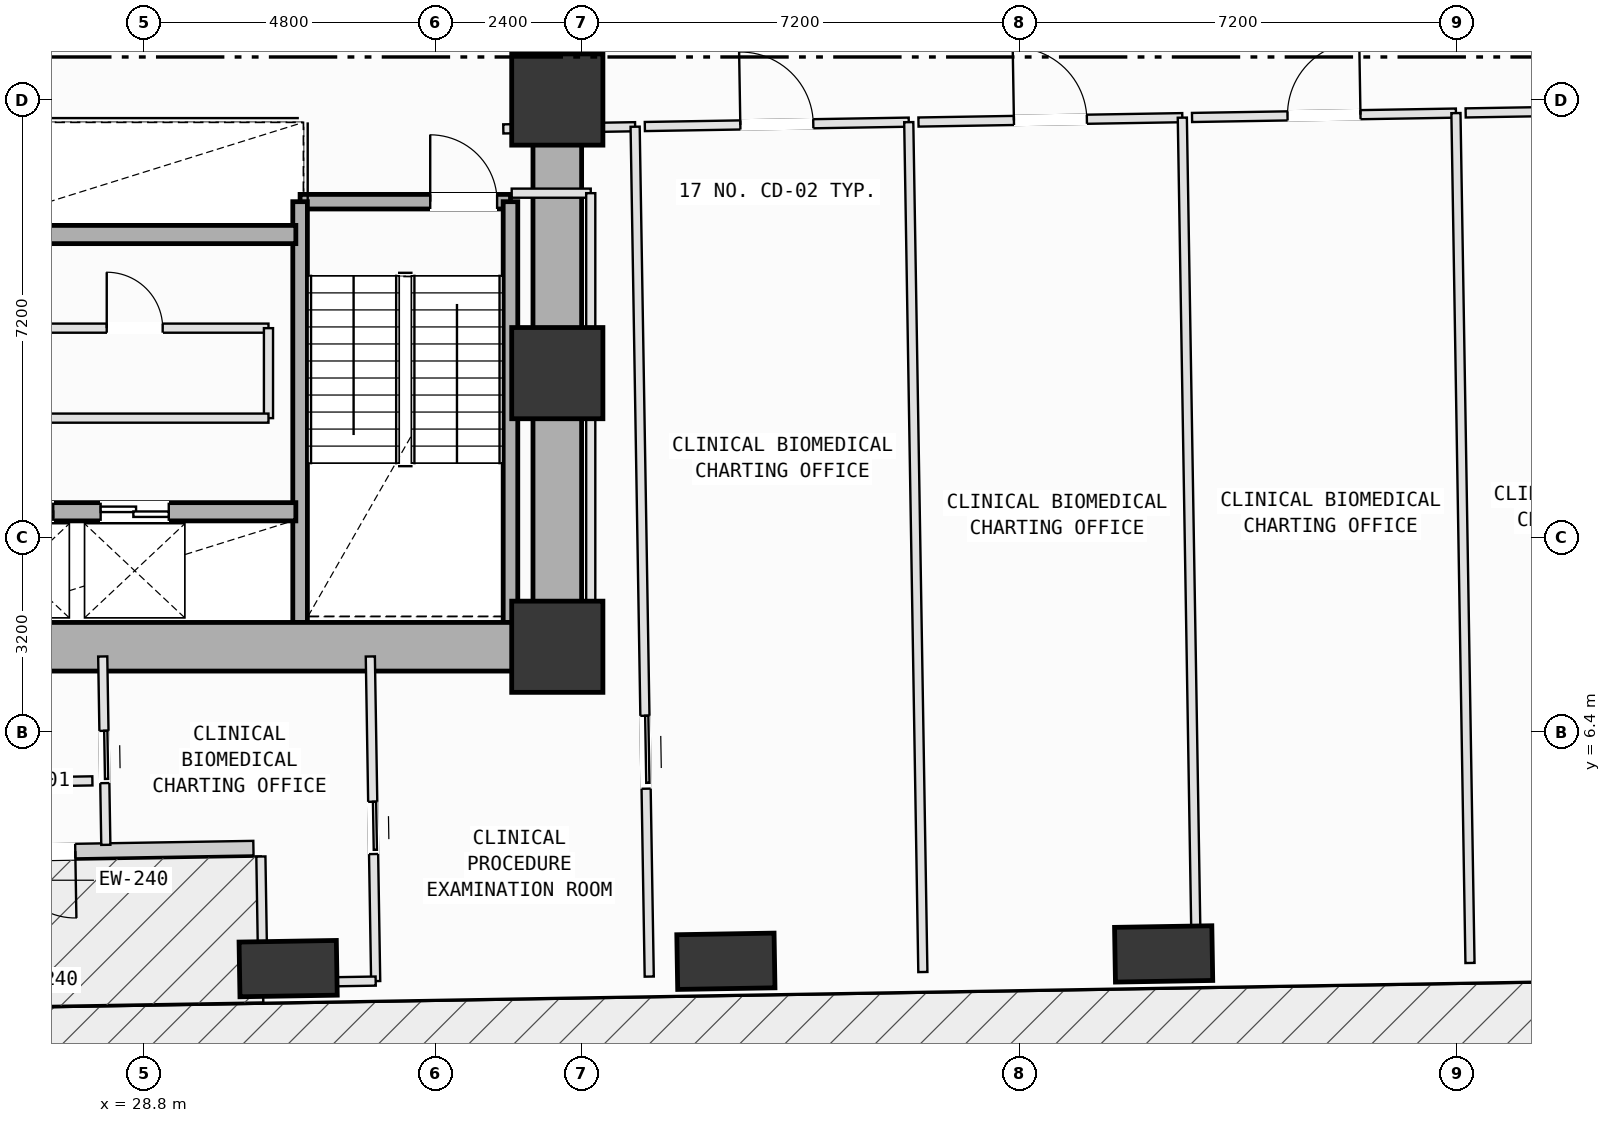
"""IFC4 building model, lengths in metres.
Left out: names, types, materials, properties, quantities, classifications, styles, units other than length and angle.
Written with IfcOpenShell. Run it as: python <this file> out.ifc"""

import sys

from ifc_helpers import new_model, si_unit, direction, frame, frame_2d, origin, origin_2d, place, context, subcontext, project, spatial, rectangle, extrude, element, fill, save


model = new_model("IFC4")
c1 = context("Model", 3, precision=1e-05, world=origin(), true_north=direction((0.0, 1.0)))
c2 = subcontext(c1, "Body", "Model", "MODEL_VIEW")
j1 = project(units=[si_unit("LENGTHUNIT", "METRE"), si_unit("PLANEANGLEUNIT", "RADIAN")], contexts=[c1])
p1 = place(None, origin())
s1 = spatial("IfcSite", under=j1, at=p1, CompositionType="ELEMENT")
p2 = place(p1, origin())
s2 = spatial("IfcBuilding", under=s1, at=p2, CompositionType="ELEMENT")
p3 = place(p2, frame((0.0, 0.0, 27.0)))
s3 = spatial("IfcBuildingStorey", under=s2, at=p3, CompositionType="ELEMENT", Elevation=27.0)
for number, where, z_axis, x_axis in (
    (1, (35.6, 7.8, 0.0), (0.0, 0.0, 1.0), (1.0, 0.0, 0.0)),
    (2, (35.6, 12.3, 0.0), (0.0, 0.0, 1.0), (1.0, 0.0, 0.0)),
    (3, (35.6, 16.8, 0.0), (0.0, 0.0, 1.0), (1.0, 0.0, 0.0)),
):
    element("IfcColumn", number, at=place(p3, frame(where, z_axis=z_axis, x_axis=x_axis)), inside=s3, PredefinedType="COLUMN", context=c2, shape_type="SweptSolid", body=[
        extrude(rectangle(XDim=1.5, YDim=1.5, at=origin_2d()), origin(), (0.0, 0.0, 1.0), 4.0),
    ])
p4 = place(p3, frame((31.174, 2.506, 0.045), z_axis=(0.092062174352, -0.009224666769, 0.995710531016), x_axis=(0.083260947283, 0.996526598458, 0.001534022092)))
e4 = element("IfcColumn", 4, at=p4, inside=s3, PredefinedType="COLUMN", context=c2, shape_type="SweptSolid", body=[
    extrude(rectangle(XDim=1.6, YDim=0.9, at=origin_2d()), origin(), (0.0, 0.0, 1.0), 3.97),
])
p5 = place(p3, frame((38.373, 2.627, 0.046), z_axis=(0.091326415015, 0.020417757431, 0.995611671839), x_axis=(-0.234262210703, 0.972172211749, 0.001551560232)))
e5 = element("IfcColumn", 5, at=p5, inside=s3, PredefinedType="COLUMN", context=c2, shape_type="SweptSolid", body=[
    extrude(rectangle(XDim=1.6, YDim=0.9, at=origin_2d()), origin(), (0.0, 0.0, 1.0), 3.97),
])
p6 = place(p3, frame((45.572, 2.748, 0.051), z_axis=(0.090543922154, 0.050131315595, 0.994629905723), x_axis=(-0.498741414355, 0.866749131608, 0.001715944321)))
e6 = element("IfcColumn", 6, at=p6, inside=s3, PredefinedType="COLUMN", context=c2, shape_type="SweptSolid", body=[
    extrude(rectangle(XDim=1.6, YDim=0.9, at=origin_2d()), origin(), (0.0, 0.0, 1.0), 3.969),
])
p7 = place(p3, frame((30.602, 4.488, 0.0), z_axis=(0.0, 0.0, 1.0), x_axis=(-0.999862345318, -0.016591877959, 0.0)))
e7 = element("IfcWall", 7, at=p7, inside=s3, PredefinedType="SOLIDWALL", context=c2, shape_type="SweptSolid", body=[
    extrude(rectangle(XDim=6.96, YDim=0.24, at=frame_2d((3.48, 0.0))), origin(), (0.0, 0.0, 1.0), 3.165),
])
p8 = place(p7, frame((2.93, 0.0, 0.0)))
e8 = element("IfcOpeningElement", 8, at=p8, cuts=e7, PredefinedType="OPENING", context=c2, shape_type="SweptSolid", body=[
    extrude(rectangle(XDim=1.1, YDim=2.15, at=frame_2d((0.55, 1.075))), frame((0.0, 0.13, 0.0), z_axis=(0.0, -1.0, 0.0), x_axis=(1.0, 0.0, 0.0)), (0.0, 0.0, 1.0), 0.26),
])
p9 = place(p3, frame((31.37, 15.12, 0.0), z_axis=(0.0, 0.0, 1.0), x_axis=(1.0, 0.0, 0.0)))
e9 = element("IfcWall", 9, at=p9, inside=s3, PredefinedType="SOLIDWALL", context=c2, shape_type="SweptSolid", body=[
    extrude(rectangle(XDim=3.46, YDim=0.24, at=frame_2d((1.73, 0.0))), origin(), (0.0, 0.0, 1.0), 3.78),
])
p10 = place(p9, frame((2.14, 0.0, 0.0)))
e10 = element("IfcOpeningElement", 10, at=p10, cuts=e9, PredefinedType="OPENING", context=c2, shape_type="SweptSolid", body=[
    extrude(rectangle(XDim=1.1, YDim=2.15, at=frame_2d((0.55, 1.075))), frame((0.0, 0.13, 0.0), z_axis=(0.0, -1.0, 0.0), x_axis=(1.0, 0.0, 0.0)), (0.0, 0.0, 1.0), 0.26),
])
for number, where, z_axis, x_axis in (
    (11, (34.83, 15.12, 0.0), (0.0, 0.0, 1.0), (0.0, -1.0, 0.0)),
    (12, (31.37, 8.2, 0.0), (0.0, 0.0, 1.0), (0.0, 1.0, 0.0)),
):
    element("IfcWall", number, at=place(p3, frame(where, z_axis=z_axis, x_axis=x_axis)), inside=s3, PredefinedType="SOLIDWALL", context=c2, shape_type="SweptSolid", body=[
        extrude(rectangle(XDim=6.92, YDim=0.24, at=frame_2d((3.46, 0.0))), origin(), (0.0, 0.0, 1.0), 3.78),
    ])
p11 = place(p3, frame((24.8, 7.8, 0.0), z_axis=(0.0, 0.0, 1.0), x_axis=(1.0, 0.0, 0.0)))
e13 = element("IfcWall", 13, at=p11, inside=s3, PredefinedType="SHEAR", context=c2, shape_type="SweptSolid", body=[
    extrude(rectangle(XDim=10.8, YDim=0.8, at=frame_2d((5.4, 0.0))), origin(), (0.0, 0.0, 1.0), 3.78),
])
p12 = place(p3, frame((35.6, 7.8, 0.0), z_axis=(0.0, 0.0, 1.0), x_axis=(0.0, 1.0, 0.0)))
e14 = element("IfcWall", 14, at=p12, inside=s3, PredefinedType="SHEAR", context=c2, shape_type="SweptSolid", body=[
    extrude(rectangle(XDim=9.0, YDim=0.8, at=frame_2d((4.5, 0.0))), origin(), (0.0, 0.0, 1.0), 3.78),
])
p13 = place(p3, frame((25.85, 10.02, 0.0), z_axis=(0.0, 0.0, 1.0), x_axis=(1.0, 0.0, 0.0)))
e15 = element("IfcWall", 15, at=p13, inside=s3, PredefinedType="SOLIDWALL", context=c2, shape_type="SweptSolid", body=[
    extrude(rectangle(XDim=5.45, YDim=0.3, at=frame_2d((2.725, 0.0))), origin(), (0.0, 0.0, 1.0), 3.78),
])
p14 = place(p13, frame((0.34, 0.0, 0.0)))
e16 = element("IfcOpeningElement", 16, at=p14, cuts=e15, PredefinedType="OPENING", context=c2, shape_type="SweptSolid", body=[
    extrude(rectangle(XDim=1.12, YDim=2.15, at=frame_2d((0.56, 1.075))), frame((0.0, 0.16, 0.0), z_axis=(0.0, -1.0, 0.0), x_axis=(1.0, 0.0, 0.0)), (0.0, 0.0, 1.0), 0.32),
])
p15 = place(p13, frame((2.24, 0.0, 0.0)))
e17 = element("IfcOpeningElement", 17, at=p15, cuts=e15, PredefinedType="OPENING", context=c2, shape_type="SweptSolid", body=[
    extrude(rectangle(XDim=1.12, YDim=2.15, at=frame_2d((0.56, 1.075))), frame((0.0, 0.16, 0.0), z_axis=(0.0, -1.0, 0.0), x_axis=(1.0, 0.0, 0.0)), (0.0, 0.0, 1.0), 0.32),
])
p16 = place(p3, frame((25.85, 14.58, 0.0), z_axis=(0.0, 0.0, 1.0), x_axis=(1.0, 0.0, 0.0)))
e18 = element("IfcWall", 18, at=p16, inside=s3, PredefinedType="SOLIDWALL", context=c2, shape_type="SweptSolid", body=[
    extrude(rectangle(XDim=5.45, YDim=0.3, at=frame_2d((2.725, 0.0))), origin(), (0.0, 0.0, 1.0), 3.78),
])
p17 = place(p3, frame((26.45, 13.04, 0.0), z_axis=(0.0, 0.0, 1.0), x_axis=(1.0, 0.0, 0.0)))
e19 = element("IfcWall", 19, at=p17, inside=s3, PredefinedType="PARTITIONING", context=c2, shape_type="SweptSolid", body=[
    extrude(rectangle(XDim=4.4, YDim=0.15, at=frame_2d((2.2, 0.0))), origin(), (0.0, 0.0, 1.0), 3.78),
])
p18 = place(p17, frame((1.74, 0.0, 0.0)))
e20 = element("IfcOpeningElement", 20, at=p18, cuts=e19, PredefinedType="OPENING", context=c2, shape_type="SweptSolid", body=[
    extrude(rectangle(XDim=0.92, YDim=2.1, at=frame_2d((0.46, 1.05))), frame((0.0, 0.085, 0.0), z_axis=(0.0, -1.0, 0.0), x_axis=(1.0, 0.0, 0.0)), (0.0, 0.0, 1.0), 0.17),
])
p19 = place(p3, frame((30.85, 13.04, 0.0), z_axis=(0.0, 0.0, 1.0), x_axis=(0.0, -1.0, 0.0)))
e21 = element("IfcWall", 21, at=p19, inside=s3, PredefinedType="PARTITIONING", context=c2, shape_type="SweptSolid", body=[
    extrude(rectangle(XDim=1.48, YDim=0.15, at=frame_2d((0.74, 0.0))), origin(), (0.0, 0.0, 1.0), 3.78),
])
p20 = place(p3, frame((30.85, 11.56, 0.0), z_axis=(0.0, 0.0, 1.0), x_axis=(-1.0, 0.0, 0.0)))
e22 = element("IfcWall", 22, at=p20, inside=s3, PredefinedType="PARTITIONING", context=c2, shape_type="SweptSolid", body=[
    extrude(rectangle(XDim=4.4, YDim=0.15, at=frame_2d((2.2, 0.0))), origin(), (0.0, 0.0, 1.0), 3.78),
])
p21 = place(p3, frame((28.124, 7.64, 0.0), z_axis=(0.0, 0.0, 1.0), x_axis=(0.016468725329, -0.999864381347, 0.0)))
e23 = element("IfcWall", 23, at=p21, inside=s3, PredefinedType="PARTITIONING", context=c2, shape_type="SweptSolid", body=[
    extrude(rectangle(XDim=3.098, YDim=0.15, at=frame_2d((1.549, 0.0))), origin(), (0.0, 0.0, 1.0), 3.78),
])
p22 = place(p21, frame((1.223, 0.0, 0.0)))
e24 = element("IfcOpeningElement", 24, at=p22, cuts=e23, PredefinedType="OPENING", context=c2, shape_type="SweptSolid", body=[
    extrude(rectangle(XDim=0.86, YDim=2.06, at=frame_2d((0.43, 1.03))), frame((0.0, 0.085, 0.0), z_axis=(0.0, -1.0, 0.0), x_axis=(1.0, 0.0, 0.0)), (0.0, 0.0, 1.0), 0.17),
])
p23 = place(p3, frame((27.954, 5.594, 0.0), z_axis=(0.0, 0.0, 1.0), x_axis=(-0.999863680072, -0.016511246871, 0.0)))
e25 = element("IfcWall", 25, at=p23, inside=s3, PredefinedType="PARTITIONING", context=c2, shape_type="SweptSolid", body=[
    extrude(rectangle(XDim=1.7, YDim=0.15, at=frame_2d((0.85, 0.0))), origin(), (0.0, 0.0, 1.0), 3.78),
])
p24 = place(p3, frame((32.525, 7.64, 0.0), z_axis=(0.0, 0.0, 1.0), x_axis=(0.016505890819, -0.999863768505, 0.0)))
e26 = element("IfcWall", 26, at=p24, inside=s3, PredefinedType="PARTITIONING", context=c2, shape_type="SweptSolid", body=[
    extrude(rectangle(XDim=5.34, YDim=0.15, at=frame_2d((2.67, 0.0))), origin(), (0.0, 0.0, 1.0), 3.78),
])
p25 = place(p24, frame((2.39, 0.0, 0.0)))
e27 = element("IfcOpeningElement", 27, at=p25, cuts=e26, PredefinedType="OPENING", context=c2, shape_type="SweptSolid", body=[
    extrude(rectangle(XDim=0.86, YDim=2.06, at=frame_2d((0.43, 1.03))), frame((0.0, 0.085, 0.0), z_axis=(0.0, -1.0, 0.0), x_axis=(1.0, 0.0, 0.0)), (0.0, 0.0, 1.0), 0.17),
])
p26 = place(p3, frame((32.613, 2.301, 0.0), z_axis=(0.0, 0.0, 1.0), x_axis=(-0.999860187766, -0.016721391078, 0.0)))
e28 = element("IfcWall", 28, at=p26, inside=s3, PredefinedType="PARTITIONING", context=c2, shape_type="SweptSolid", body=[
    extrude(rectangle(XDim=1.854, YDim=0.15, at=frame_2d((0.927, 0.0))), origin(), (0.0, 0.0, 1.0), 3.145),
])
p27 = place(p3, frame((30.759, 2.27, 0.0), z_axis=(0.0, 0.0, 1.0), x_axis=(-0.016312383245, 0.999866944225, 0.0)))
e29 = element("IfcWall", 29, at=p27, inside=s3, PredefinedType="PARTITIONING", context=c2, shape_type="SweptSolid", body=[
    extrude(rectangle(XDim=2.08, YDim=0.15, at=frame_2d((1.04, 0.0))), origin(), (0.0, 0.0, 1.0), 3.78),
])
p28 = place(p3, frame((36.15, 15.26, 0.0), z_axis=(0.0, 0.0, 1.0), x_axis=(-1.0, 0.0, 0.0)))
e30 = element("IfcWall", 30, at=p28, inside=s3, PredefinedType="PARTITIONING", context=c2, shape_type="SweptSolid", body=[
    extrude(rectangle(XDim=1.3, YDim=0.15, at=frame_2d((0.65, 0.0))), origin(), (0.0, 0.0, 1.0), 3.78),
])
p29 = place(p3, frame((34.712, 16.317, 0.0), z_axis=(0.0, 0.0, 1.0), x_axis=(0.99986114004, 0.016664352334, 0.0)))
e31 = element("IfcWall", 31, at=p29, inside=s3, PredefinedType="PARTITIONING", context=c2, shape_type="SweptSolid", body=[
    extrude(rectangle(XDim=2.168, YDim=0.15, at=frame_2d((1.084, 0.0))), origin(), (0.0, 0.0, 1.0), 2.765),
])
p30 = place(p3, frame((36.88, 16.353, 0.0), z_axis=(0.0, 0.0, 1.0), x_axis=(0.016607902284, -0.99986207928, 0.0)))
e32 = element("IfcWall", 32, at=p30, inside=s3, PredefinedType="PARTITIONING", context=c2, shape_type="SweptSolid", body=[
    extrude(rectangle(XDim=13.98, YDim=0.15, at=frame_2d((6.99, 0.0))), origin(), (0.0, 0.0, 1.0), 3.78),
])
p31 = place(p30, frame((9.689, 0.0, 0.0)))
e33 = element("IfcOpeningElement", 33, at=p31, cuts=e32, PredefinedType="OPENING", context=c2, shape_type="SweptSolid", body=[
    extrude(rectangle(XDim=1.2, YDim=2.15, at=frame_2d((0.6, 1.075))), frame((0.0, 0.085, 0.0), z_axis=(0.0, -1.0, 0.0), x_axis=(1.0, 0.0, 0.0)), (0.0, 0.0, 1.0), 0.17),
])
p32 = place(p3, frame((35.6, 7.5, 0.0), z_axis=(0.0, 0.0, 1.0), x_axis=(1.0, 0.0, 0.0)))
e34 = element("IfcWall", 34, at=p32, inside=s3, PredefinedType="PARTITIONING", context=c2, shape_type="SweptSolid", body=[
    extrude(rectangle(XDim=0.55, YDim=0.15, at=frame_2d((0.275, 0.0))), origin(), (0.0, 0.0, 1.0), 2.765),
])
p33 = place(p3, frame((36.15, 7.5, 0.0), z_axis=(0.0, 0.0, 1.0), x_axis=(0.0, 1.0, 0.0)))
e35 = element("IfcWall", 35, at=p33, inside=s3, PredefinedType="PARTITIONING", context=c2, shape_type="SweptSolid", body=[
    extrude(rectangle(XDim=7.76, YDim=0.15, at=frame_2d((3.88, 0.0))), origin(), (0.0, 0.0, 1.0), 3.78),
])
p34 = place(p3, frame((37.04, 16.356, 0.0), z_axis=(0.0, 0.0, 1.0), x_axis=(0.999862324628, 0.016593124762, 0.0)))
e36 = element("IfcWall", 36, at=p34, inside=s3, PredefinedType="PARTITIONING", context=c2, shape_type="SweptSolid", body=[
    extrude(rectangle(XDim=4.34, YDim=0.15, at=frame_2d((2.17, 0.0))), origin(), (0.0, 0.0, 1.0), 2.765),
])
p35 = place(p34, frame((1.57, 0.0, 0.0)))
e37 = element("IfcOpeningElement", 37, at=p35, cuts=e36, PredefinedType="OPENING", context=c2, shape_type="SweptSolid", body=[
    extrude(rectangle(XDim=1.2, YDim=2.15, at=frame_2d((0.6, 1.075))), frame((0.0, 0.085, 0.0), z_axis=(0.0, -1.0, 0.0), x_axis=(1.0, 0.0, 0.0)), (0.0, 0.0, 1.0), 0.17),
])
p36 = place(p3, frame((41.38, 16.428, 0.0), z_axis=(0.0, 0.0, 1.0), x_axis=(0.016607902284, -0.99986207928, 0.0)))
e38 = element("IfcWall", 38, at=p36, inside=s3, PredefinedType="PARTITIONING", context=c2, shape_type="SweptSolid", body=[
    extrude(rectangle(XDim=13.98, YDim=0.15, at=frame_2d((6.99, 0.0))), origin(), (0.0, 0.0, 1.0), 3.78),
])
p37 = place(p3, frame((41.54, 16.43, 0.0), z_axis=(0.0, 0.0, 1.0), x_axis=(0.99986226266, 0.0165968584, 0.0)))
e39 = element("IfcWall", 39, at=p37, inside=s3, PredefinedType="PARTITIONING", context=c2, shape_type="SweptSolid", body=[
    extrude(rectangle(XDim=4.339, YDim=0.15, at=frame_2d((2.17, 0.0))), origin(), (0.0, 0.0, 1.0), 2.765),
])
p38 = place(p37, frame((1.57, 0.0, 0.0)))
e40 = element("IfcOpeningElement", 40, at=p38, cuts=e39, PredefinedType="OPENING", context=c2, shape_type="SweptSolid", body=[
    extrude(rectangle(XDim=1.2, YDim=2.15, at=frame_2d((0.6, 1.075))), frame((0.0, 0.085, 0.0), z_axis=(0.0, -1.0, 0.0), x_axis=(1.0, 0.0, 0.0)), (0.0, 0.0, 1.0), 0.17),
])
p39 = place(p3, frame((45.879, 16.502, 0.0), z_axis=(0.0, 0.0, 1.0), x_axis=(0.016607902284, -0.99986207928, 0.0)))
e41 = element("IfcWall", 41, at=p39, inside=s3, PredefinedType="PARTITIONING", context=c2, shape_type="SweptSolid", body=[
    extrude(rectangle(XDim=13.98, YDim=0.15, at=frame_2d((6.99, 0.0))), origin(), (0.0, 0.0, 1.0), 3.78),
])
p40 = place(p3, frame((46.039, 16.505, 0.0), z_axis=(0.0, 0.0, 1.0), x_axis=(0.999862324628, 0.016593124762, 0.0)))
e42 = element("IfcWall", 42, at=p40, inside=s3, PredefinedType="PARTITIONING", context=c2, shape_type="SweptSolid", body=[
    extrude(rectangle(XDim=4.34, YDim=0.15, at=frame_2d((2.17, 0.0))), origin(), (0.0, 0.0, 1.0), 2.765),
])
p41 = place(p40, frame((1.57, 0.0, 0.0)))
e43 = element("IfcOpeningElement", 43, at=p41, cuts=e42, PredefinedType="OPENING", context=c2, shape_type="SweptSolid", body=[
    extrude(rectangle(XDim=1.2, YDim=2.15, at=frame_2d((0.6, 1.075))), frame((0.0, 0.085, 0.0), z_axis=(0.0, -1.0, 0.0), x_axis=(1.0, 0.0, 0.0)), (0.0, 0.0, 1.0), 0.17),
])
p42 = place(p3, frame((50.379, 16.577, 0.0), z_axis=(0.0, 0.0, 1.0), x_axis=(0.016538355732, -0.999863232042, 0.0)))
e44 = element("IfcWall", 44, at=p42, inside=s3, PredefinedType="PARTITIONING", context=c2, shape_type="SweptSolid", body=[
    extrude(rectangle(XDim=13.98, YDim=0.15, at=frame_2d((6.99, 0.0))), origin(), (0.0, 0.0, 1.0), 3.78),
])
p43 = place(p3, frame((50.539, 16.58, 0.0), z_axis=(0.0, 0.0, 1.0), x_axis=(0.99986226266, 0.0165968584, 0.0)))
e45 = element("IfcWall", 45, at=p43, inside=s3, PredefinedType="PARTITIONING", context=c2, shape_type="SweptSolid", body=[
    extrude(rectangle(XDim=4.339, YDim=0.15, at=frame_2d((2.17, 0.0))), origin(), (0.0, 0.0, 1.0), 3.78),
])
p44 = place(p43, frame((1.57, 0.0, 0.0)))
e46 = element("IfcOpeningElement", 46, at=p44, cuts=e45, PredefinedType="OPENING", context=c2, shape_type="SweptSolid", body=[
    extrude(rectangle(XDim=1.2, YDim=2.15, at=frame_2d((0.6, 1.075))), frame((0.0, 0.085, 0.0), z_axis=(0.0, -1.0, 0.0), x_axis=(1.0, 0.0, 0.0)), (0.0, 0.0, 1.0), 0.17),
])
p45 = place(p8, origin())
e47 = element("IfcDoor", 47, at=p45, inside=s3, OperationType="SINGLE_SWING_LEFT", PredefinedType="DOOR", context=c2, shape_type="SweptSolid", body=[
    extrude(rectangle(XDim=1.1, YDim=2.15, at=frame_2d((0.55, 1.075))), frame((0.0, 0.025, 0.0), z_axis=(0.0, -1.0, 0.0), x_axis=(1.0, 0.0, 0.0)), (0.0, 0.0, 1.0), 0.05),
])
fill(e8, e47)
p46 = place(p10, origin())
e48 = element("IfcDoor", 48, at=p46, inside=s3, OperationType="SINGLE_SWING_LEFT", PredefinedType="DOOR", context=c2, shape_type="SweptSolid", body=[
    extrude(rectangle(XDim=1.1, YDim=2.15, at=frame_2d((0.55, 1.075))), frame((0.0, 0.025, 0.0), z_axis=(0.0, -1.0, 0.0), x_axis=(1.0, 0.0, 0.0)), (0.0, 0.0, 1.0), 0.05),
])
fill(e10, e48)
p47 = place(p14, origin())
e49 = element("IfcDoor", 49, at=p47, inside=s3, OperationType="DOUBLE_DOOR_SLIDING", PredefinedType="DOOR", context=c2, shape_type="SweptSolid", body=[
    extrude(rectangle(XDim=1.12, YDim=2.15, at=frame_2d((0.56, 1.075))), frame((0.0, 0.025, 0.0), z_axis=(0.0, -1.0, 0.0), x_axis=(1.0, 0.0, 0.0)), (0.0, 0.0, 1.0), 0.05),
])
fill(e16, e49)
p48 = place(p15, origin())
e50 = element("IfcDoor", 50, at=p48, inside=s3, OperationType="DOUBLE_DOOR_SLIDING", PredefinedType="DOOR", context=c2, shape_type="SweptSolid", body=[
    extrude(rectangle(XDim=1.12, YDim=2.15, at=frame_2d((0.56, 1.075))), frame((0.0, 0.025, 0.0), z_axis=(0.0, -1.0, 0.0), x_axis=(1.0, 0.0, 0.0)), (0.0, 0.0, 1.0), 0.05),
])
fill(e17, e50)
p49 = place(p18, origin())
e51 = element("IfcDoor", 51, at=p49, inside=s3, OperationType="SINGLE_SWING_LEFT", PredefinedType="DOOR", context=c2, shape_type="SweptSolid", body=[
    extrude(rectangle(XDim=0.92, YDim=2.1, at=frame_2d((0.46, 1.05))), frame((0.0, 0.025, 0.0), z_axis=(0.0, -1.0, 0.0), x_axis=(1.0, 0.0, 0.0)), (0.0, 0.0, 1.0), 0.05),
])
fill(e20, e51)
p50 = place(p35, origin())
e52 = element("IfcDoor", 52, at=p50, inside=s3, OperationType="SINGLE_SWING_LEFT", PredefinedType="DOOR", context=c2, shape_type="SweptSolid", body=[
    extrude(rectangle(XDim=1.2, YDim=2.15, at=frame_2d((0.6, 1.075))), frame((0.0, 0.025, 0.0), z_axis=(0.0, -1.0, 0.0), x_axis=(1.0, 0.0, 0.0)), (0.0, 0.0, 1.0), 0.05),
])
fill(e37, e52)
p51 = place(p38, origin())
e53 = element("IfcDoor", 53, at=p51, inside=s3, OperationType="SINGLE_SWING_LEFT", PredefinedType="DOOR", context=c2, shape_type="SweptSolid", body=[
    extrude(rectangle(XDim=1.2, YDim=2.15, at=frame_2d((0.6, 1.075))), frame((0.0, 0.025, 0.0), z_axis=(0.0, -1.0, 0.0), x_axis=(1.0, 0.0, 0.0)), (0.0, 0.0, 1.0), 0.05),
])
fill(e40, e53)
p52 = place(p41, origin())
e54 = element("IfcDoor", 54, at=p52, inside=s3, OperationType="SINGLE_SWING_RIGHT", PredefinedType="DOOR", context=c2, shape_type="SweptSolid", body=[
    extrude(rectangle(XDim=1.2, YDim=2.15, at=frame_2d((0.6, 1.075))), frame((0.0, 0.025, 0.0), z_axis=(0.0, -1.0, 0.0), x_axis=(1.0, 0.0, 0.0)), (0.0, 0.0, 1.0), 0.05),
])
fill(e43, e54)
p53 = place(p31, origin())
e55 = element("IfcDoor", 55, at=p53, inside=s3, OperationType="SLIDING_TO_LEFT", PredefinedType="DOOR", context=c2, shape_type="SweptSolid", body=[
    extrude(rectangle(XDim=1.2, YDim=2.15, at=frame_2d((0.6, 1.075))), frame((0.0, 0.025, 0.0), z_axis=(0.0, -1.0, 0.0), x_axis=(1.0, 0.0, 0.0)), (0.0, 0.0, 1.0), 0.05),
])
fill(e33, e55)
p54 = place(p25, origin())
e56 = element("IfcDoor", 56, at=p54, inside=s3, OperationType="SLIDING_TO_LEFT", PredefinedType="DOOR", context=c2, shape_type="SweptSolid", body=[
    extrude(rectangle(XDim=0.86, YDim=2.06, at=frame_2d((0.43, 1.03))), frame((0.0, 0.025, 0.0), z_axis=(0.0, -1.0, 0.0), x_axis=(1.0, 0.0, 0.0)), (0.0, 0.0, 1.0), 0.05),
])
fill(e27, e56)
p55 = place(p22, origin())
e57 = element("IfcDoor", 57, at=p55, inside=s3, OperationType="SLIDING_TO_LEFT", PredefinedType="DOOR", context=c2, shape_type="SweptSolid", body=[
    extrude(rectangle(XDim=0.86, YDim=2.06, at=frame_2d((0.43, 1.03))), frame((0.0, 0.025, 0.0), z_axis=(0.0, -1.0, 0.0), x_axis=(1.0, 0.0, 0.0)), (0.0, 0.0, 1.0), 0.05),
])
fill(e24, e57)
save(model, sys.argv[1])
